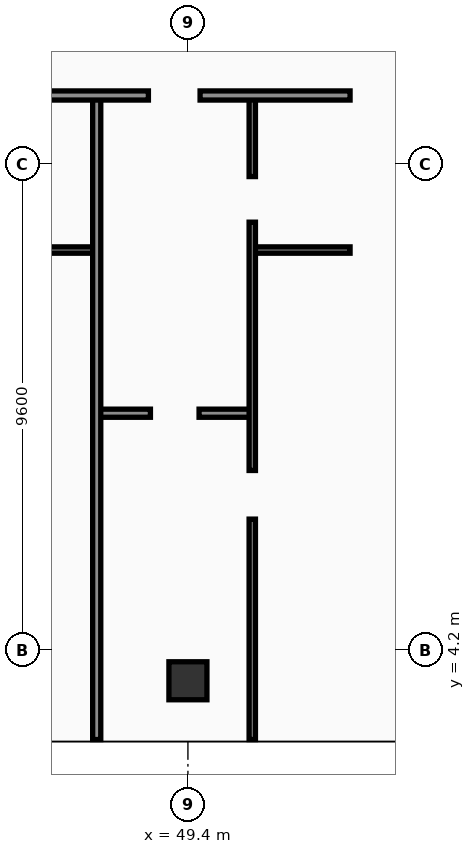
"""IFC4 building model, lengths in metres.
Left out: names, types, materials, properties, quantities, classifications, styles, units other than length and angle.
Written with IfcOpenShell. Run it as: python <this file> out.ifc"""

import sys

from ifc_helpers import new_model, si_unit, direction, frame, frame_2d, origin, origin_2d, place, context, subcontext, project, spatial, rectangle, hollow_rectangle, extrude, element, fill, save


model = new_model("IFC4")
c1 = context("Model", 3, precision=1e-05, world=origin(), true_north=direction((0.0, 1.0)))
c2 = subcontext(c1, "Body", "Model", "MODEL_VIEW")
j1 = project(units=[si_unit("LENGTHUNIT", "METRE"), si_unit("PLANEANGLEUNIT", "RADIAN")], contexts=[c1])
p1 = place(None, origin())
s1 = spatial("IfcSite", under=j1, at=p1, CompositionType="ELEMENT")
p2 = place(p1, origin())
s2 = spatial("IfcBuilding", under=s1, at=p2, CompositionType="ELEMENT")
p3 = place(p2, frame((0.0, 0.0, 171.3)))
s3 = spatial("IfcBuildingStorey", under=s2, at=p3, CompositionType="ELEMENT", Elevation=171.3)
p4 = place(p3, frame((49.4, 3.6, 0.0), z_axis=(0.0, 0.0, 1.0), x_axis=(1.0, 0.0, 0.0)))
e1 = element("IfcColumn", 1, at=p4, inside=s3, PredefinedType="COLUMN", context=c2, shape_type="SweptSolid", body=[
    extrude(hollow_rectangle(XDim=0.75, YDim=0.75, WallThickness=0.032, at=origin_2d()), origin(), (0.0, 0.0, 1.0), 3.56),
])
p5 = place(p3, frame((59.23, 5.505, 0.0), z_axis=(0.0, 0.0, 1.0), x_axis=(-0.300509063924, 0.953778958931, 0.0)))
e2 = element("IfcWall", 2, at=p5, inside=s3, PredefinedType="SOLIDWALL", context=c2, shape_type="SweptSolid", body=[
    extrude(rectangle(XDim=30.814, YDim=0.32, at=frame_2d((15.407, 0.0))), origin(), (0.0, 0.0, 1.0), 3.56),
])
p6 = place(p5, frame((4.747, 0.0, 0.0)))
e3 = element("IfcOpeningElement", 3, at=p6, cuts=e2, PredefinedType="OPENING", context=c2, shape_type="SweptSolid", body=[
    extrude(rectangle(XDim=1.4, YDim=2.25, at=frame_2d((0.7, 1.125))), frame((0.0, 0.17, 0.0), z_axis=(0.0, -1.0, 0.0), x_axis=(1.0, 0.0, 0.0)), (0.0, 0.0, 1.0), 0.34),
])
p7 = place(p5, frame((1.6, 0.0, 0.75)))
e4 = element("IfcOpeningElement", 4, at=p7, cuts=e2, PredefinedType="OPENING", context=c2, shape_type="SweptSolid", body=[
    extrude(rectangle(XDim=1.5, YDim=1.6, at=frame_2d((0.75, 0.8))), frame((0.0, 0.17, 0.0), z_axis=(0.0, -1.0, 0.0), x_axis=(1.0, 0.0, 0.0)), (0.0, 0.0, 1.0), 0.34),
])
p8 = place(p5, frame((7.8, 0.0, 0.75)))
e5 = element("IfcOpeningElement", 5, at=p8, cuts=e2, PredefinedType="OPENING", context=c2, shape_type="SweptSolid", body=[
    extrude(rectangle(XDim=1.5, YDim=1.6, at=frame_2d((0.75, 0.8))), frame((0.0, 0.17, 0.0), z_axis=(0.0, -1.0, 0.0), x_axis=(1.0, 0.0, 0.0)), (0.0, 0.0, 1.0), 0.34),
])
p9 = place(p5, frame((10.9, 0.0, 0.75)))
e6 = element("IfcOpeningElement", 6, at=p9, cuts=e2, PredefinedType="OPENING", context=c2, shape_type="SweptSolid", body=[
    extrude(rectangle(XDim=1.5, YDim=1.6, at=frame_2d((0.75, 0.8))), frame((0.0, 0.17, 0.0), z_axis=(0.0, -1.0, 0.0), x_axis=(1.0, 0.0, 0.0)), (0.0, 0.0, 1.0), 0.34),
])
p10 = place(p5, frame((14.0, 0.0, 0.75)))
e7 = element("IfcOpeningElement", 7, at=p10, cuts=e2, PredefinedType="OPENING", context=c2, shape_type="SweptSolid", body=[
    extrude(rectangle(XDim=1.5, YDim=1.6, at=frame_2d((0.75, 0.8))), frame((0.0, 0.17, 0.0), z_axis=(0.0, -1.0, 0.0), x_axis=(1.0, 0.0, 0.0)), (0.0, 0.0, 1.0), 0.34),
])
p11 = place(p5, frame((17.1, 0.0, 0.75)))
e8 = element("IfcOpeningElement", 8, at=p11, cuts=e2, PredefinedType="OPENING", context=c2, shape_type="SweptSolid", body=[
    extrude(rectangle(XDim=1.5, YDim=1.6, at=frame_2d((0.75, 0.8))), frame((0.0, 0.17, 0.0), z_axis=(0.0, -1.0, 0.0), x_axis=(1.0, 0.0, 0.0)), (0.0, 0.0, 1.0), 0.34),
])
p12 = place(p5, frame((20.2, 0.0, 0.75)))
e9 = element("IfcOpeningElement", 9, at=p12, cuts=e2, PredefinedType="OPENING", context=c2, shape_type="SweptSolid", body=[
    extrude(rectangle(XDim=1.5, YDim=1.6, at=frame_2d((0.75, 0.8))), frame((0.0, 0.17, 0.0), z_axis=(0.0, -1.0, 0.0), x_axis=(1.0, 0.0, 0.0)), (0.0, 0.0, 1.0), 0.34),
])
p13 = place(p5, frame((23.3, 0.0, 0.75)))
e10 = element("IfcOpeningElement", 10, at=p13, cuts=e2, PredefinedType="OPENING", context=c2, shape_type="SweptSolid", body=[
    extrude(rectangle(XDim=1.5, YDim=1.6, at=frame_2d((0.75, 0.8))), frame((0.0, 0.17, 0.0), z_axis=(0.0, -1.0, 0.0), x_axis=(1.0, 0.0, 0.0)), (0.0, 0.0, 1.0), 0.34),
])
p14 = place(p5, frame((26.4, 0.0, 0.75)))
e11 = element("IfcOpeningElement", 11, at=p14, cuts=e2, PredefinedType="OPENING", context=c2, shape_type="SweptSolid", body=[
    extrude(rectangle(XDim=1.5, YDim=1.6, at=frame_2d((0.75, 0.8))), frame((0.0, 0.17, 0.0), z_axis=(0.0, -1.0, 0.0), x_axis=(1.0, 0.0, 0.0)), (0.0, 0.0, 1.0), 0.34),
])
p15 = place(p3, frame((45.67, 12.1, 0.0), z_axis=(0.0, 0.0, 1.0), x_axis=(1.0, 0.0, 0.0)))
e12 = element("IfcWall", 12, at=p15, inside=s3, PredefinedType="PARTITIONING", context=c2, shape_type="SweptSolid", body=[
    extrude(rectangle(XDim=1.93, YDim=0.125, at=frame_2d((0.965, 0.0))), origin(), (0.0, 0.0, 1.0), 2.94),
])
p16 = place(p3, frame((50.67, 12.1, 0.0), z_axis=(0.0, 0.0, 1.0), x_axis=(1.0, 0.0, 0.0)))
e13 = element("IfcWall", 13, at=p16, inside=s3, PredefinedType="PARTITIONING", context=c2, shape_type="SweptSolid", body=[
    extrude(rectangle(XDim=1.93, YDim=0.125, at=frame_2d((0.965, 0.0))), origin(), (0.0, 0.0, 1.0), 3.56),
])
p17 = place(p3, frame((47.6, 8.88, 0.0), z_axis=(0.0, 0.0, 1.0), x_axis=(1.0, 0.0, 0.0)))
e14 = element("IfcWall", 14, at=p17, inside=s3, PredefinedType="PARTITIONING", context=c2, shape_type="SweptSolid", body=[
    extrude(rectangle(XDim=3.07, YDim=0.16, at=frame_2d((1.535, 0.0))), origin(), (0.0, 0.0, 1.0), 2.94),
])
p18 = place(p17, frame((1.06, 0.0, 0.0)))
e15 = element("IfcOpeningElement", 15, at=p18, cuts=e14, PredefinedType="OPENING", context=c2, shape_type="SweptSolid", body=[
    extrude(rectangle(XDim=0.96, YDim=2.2, at=frame_2d((0.48, 1.1))), frame((0.0, 0.09, 0.0), z_axis=(0.0, -1.0, 0.0), x_axis=(1.0, 0.0, 0.0)), (0.0, 0.0, 1.0), 0.18),
])
p19 = place(p3, frame((50.67, 2.44, 0.0), z_axis=(0.0, 0.0, 1.0), x_axis=(0.0, 1.0, 0.0)))
e16 = element("IfcWall", 16, at=p19, inside=s3, PredefinedType="PARTITIONING", context=c2, shape_type="SweptSolid", body=[
    extrude(rectangle(XDim=12.71, YDim=0.125, at=frame_2d((6.355, 0.0))), origin(), (0.0, 0.0, 1.0), 3.04),
])
p20 = place(p19, frame((4.35, 0.0, 0.0)))
e17 = element("IfcOpeningElement", 17, at=p20, cuts=e16, PredefinedType="OPENING", context=c2, shape_type="SweptSolid", body=[
    extrude(rectangle(XDim=0.96, YDim=2.2, at=frame_2d((0.48, 1.1))), frame((0.0, 0.073, 0.0), z_axis=(0.0, -1.0, 0.0), x_axis=(1.0, 0.0, 0.0)), (0.0, 0.0, 1.0), 0.145),
])
p21 = place(p19, frame((10.21, 0.0, 0.0)))
e18 = element("IfcOpeningElement", 18, at=p21, cuts=e16, PredefinedType="OPENING", context=c2, shape_type="SweptSolid", body=[
    extrude(rectangle(XDim=0.9, YDim=2.15, at=frame_2d((0.45, 1.075))), frame((0.0, 0.073, 0.0), z_axis=(0.0, -1.0, 0.0), x_axis=(1.0, 0.0, 0.0)), (0.0, 0.0, 1.0), 0.145),
])
p22 = place(p3, frame((47.6, 2.44, 0.0), z_axis=(0.0, 0.0, 1.0), x_axis=(0.0, 1.0, 0.0)))
e19 = element("IfcWall", 19, at=p22, inside=s3, PredefinedType="PARTITIONING", context=c2, shape_type="SweptSolid", body=[
    extrude(rectangle(XDim=12.71, YDim=0.16, at=frame_2d((6.355, 0.0))), origin(), (0.0, 0.0, 1.0), 2.94),
])
p23 = place(p3, frame((32.4, 15.15, 0.0), z_axis=(0.0, 0.0, 1.0), x_axis=(1.0, 0.0, 0.0)))
e20 = element("IfcWall", 20, at=p23, inside=s3, PredefinedType="PARTITIONING", context=c2, shape_type="SweptSolid", body=[
    extrude(rectangle(XDim=20.2, YDim=0.18, at=frame_2d((10.1, 0.0))), origin(), (0.0, 0.0, 1.0), 2.94),
])
p24 = place(p23, frame((0.95, 0.0, 0.0)))
e21 = element("IfcOpeningElement", 21, at=p24, cuts=e20, PredefinedType="OPENING", context=c2, shape_type="SweptSolid", body=[
    extrude(rectangle(XDim=1.02, YDim=2.2, at=frame_2d((0.51, 1.1))), frame((0.0, 0.1, 0.0), z_axis=(0.0, -1.0, 0.0), x_axis=(1.0, 0.0, 0.0)), (0.0, 0.0, 1.0), 0.2),
])
p25 = place(p23, frame((5.95, 0.0, 0.0)))
e22 = element("IfcOpeningElement", 22, at=p25, cuts=e20, PredefinedType="OPENING", context=c2, shape_type="SweptSolid", body=[
    extrude(rectangle(XDim=1.02, YDim=2.2, at=frame_2d((0.51, 1.1))), frame((0.0, 0.1, 0.0), z_axis=(0.0, -1.0, 0.0), x_axis=(1.0, 0.0, 0.0)), (0.0, 0.0, 1.0), 0.2),
])
p26 = place(p23, frame((11.22, 0.0, 0.0)))
e23 = element("IfcOpeningElement", 23, at=p26, cuts=e20, PredefinedType="OPENING", context=c2, shape_type="SweptSolid", body=[
    extrude(rectangle(XDim=1.02, YDim=2.2, at=frame_2d((0.51, 1.1))), frame((0.0, 0.1, 0.0), z_axis=(0.0, -1.0, 0.0), x_axis=(1.0, 0.0, 0.0)), (0.0, 0.0, 1.0), 0.2),
])
p27 = place(p23, frame((16.22, 0.0, 0.0)))
e24 = element("IfcOpeningElement", 24, at=p27, cuts=e20, PredefinedType="OPENING", context=c2, shape_type="SweptSolid", body=[
    extrude(rectangle(XDim=1.02, YDim=2.2, at=frame_2d((0.51, 1.1))), frame((0.0, 0.1, 0.0), z_axis=(0.0, -1.0, 0.0), x_axis=(1.0, 0.0, 0.0)), (0.0, 0.0, 1.0), 0.2),
])
p28 = place(p18, origin())
e25 = element("IfcDoor", 25, at=p28, inside=s3, OperationType="SINGLE_SWING_LEFT", PredefinedType="DOOR", context=c2, shape_type="SweptSolid", body=[
    extrude(rectangle(XDim=0.96, YDim=2.2, at=frame_2d((0.48, 1.1))), frame((0.0, 0.025, 0.0), z_axis=(0.0, -1.0, 0.0), x_axis=(1.0, 0.0, 0.0)), (0.0, 0.0, 1.0), 0.05),
])
fill(e15, e25)
p29 = place(p20, origin())
e26 = element("IfcDoor", 26, at=p29, inside=s3, OperationType="SINGLE_SWING_LEFT", PredefinedType="DOOR", context=c2, shape_type="SweptSolid", body=[
    extrude(rectangle(XDim=0.96, YDim=2.2, at=frame_2d((0.48, 1.1))), frame((0.0, 0.025, 0.0), z_axis=(0.0, -1.0, 0.0), x_axis=(1.0, 0.0, 0.0)), (0.0, 0.0, 1.0), 0.05),
])
fill(e17, e26)
p30 = place(p21, origin())
e27 = element("IfcDoor", 27, at=p30, inside=s3, OperationType="SINGLE_SWING_RIGHT", PredefinedType="DOOR", context=c2, shape_type="SweptSolid", body=[
    extrude(rectangle(XDim=0.9, YDim=2.15, at=frame_2d((0.45, 1.075))), frame((0.0, 0.025, 0.0), z_axis=(0.0, -1.0, 0.0), x_axis=(1.0, 0.0, 0.0)), (0.0, 0.0, 1.0), 0.05),
])
fill(e18, e27)
p31 = place(p27, origin())
e28 = element("IfcDoor", 28, at=p31, inside=s3, OperationType="SINGLE_SWING_RIGHT", PredefinedType="DOOR", context=c2, shape_type="SweptSolid", body=[
    extrude(rectangle(XDim=1.02, YDim=2.2, at=frame_2d((0.51, 1.1))), frame((0.0, 0.025, 0.0), z_axis=(0.0, -1.0, 0.0), x_axis=(1.0, 0.0, 0.0)), (0.0, 0.0, 1.0), 0.05),
])
fill(e24, e28)
save(model, sys.argv[1])
